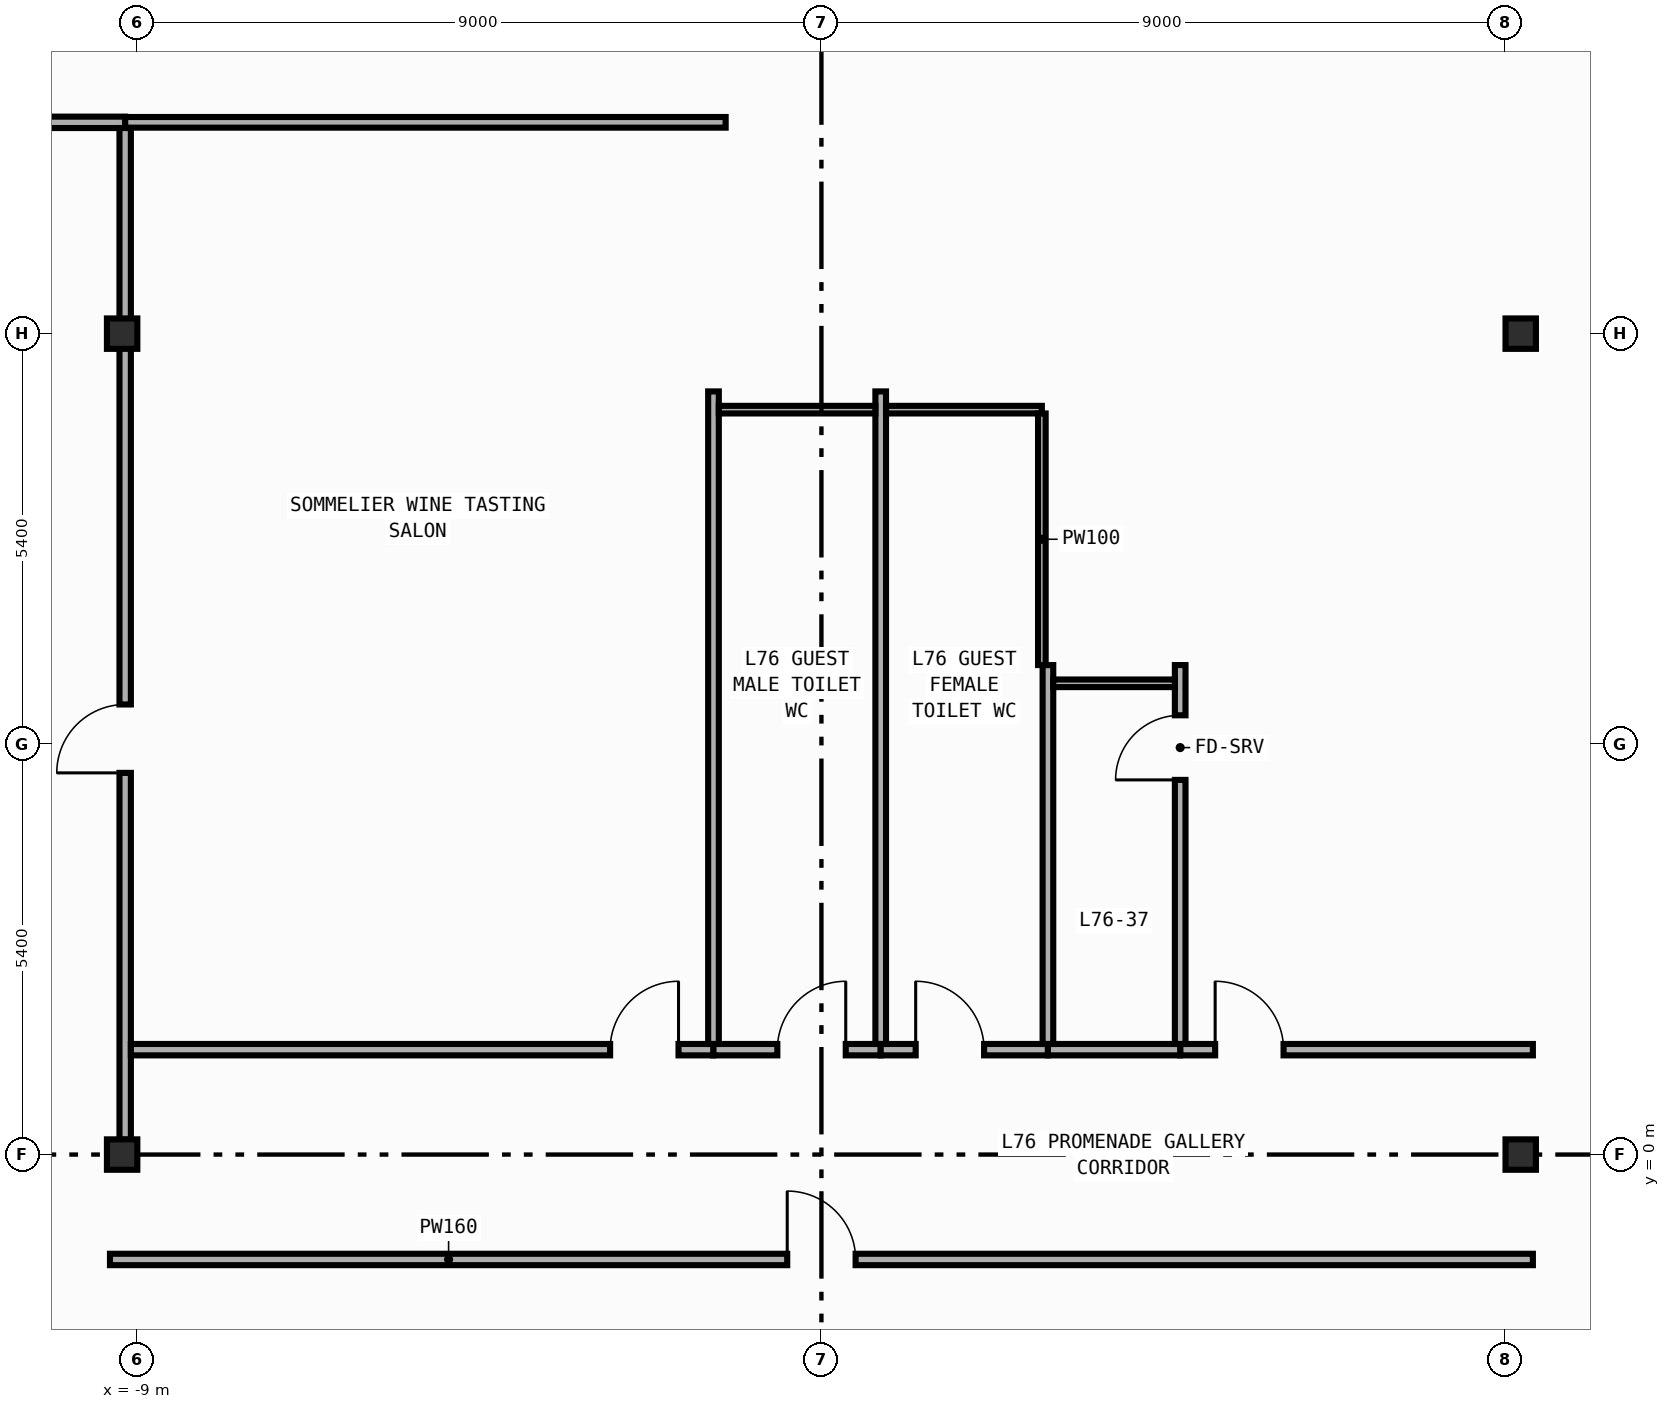
"""IFC4 building model, lengths in metres.
Left out: names, types, materials, properties, quantities, classifications, styles, units other than length and angle.
Written with IfcOpenShell. Run it as: python <this file> out.ifc"""

import sys

from ifc_helpers import new_model, si_unit, direction, frame, frame_2d, origin, origin_2d, place, context, subcontext, project, spatial, rectangle, i_section, extrude, element, fill, save


model = new_model("IFC4")
c1 = context("Model", 3, precision=1e-05, world=origin(), true_north=direction((0.0, 1.0)))
c2 = subcontext(c1, "Body", "Model", "MODEL_VIEW")
j1 = project(units=[si_unit("LENGTHUNIT", "METRE"), si_unit("PLANEANGLEUNIT", "RADIAN")], contexts=[c1])
p1 = place(None, origin())
s1 = spatial("IfcSite", under=j1, at=p1, CompositionType="ELEMENT")
p2 = place(p1, origin())
s2 = spatial("IfcBuilding", under=s1, at=p2, CompositionType="ELEMENT")
p3 = place(p2, frame((0.0, 0.0, 315.6)))
s3 = spatial("IfcBuildingStorey", under=s2, at=p3, CompositionType="ELEMENT", Elevation=315.6)
for number, where, z_axis, x_axis in (
    (1, (-9.2, 0.0, 0.0), (0.0, 0.0, 1.0), (1.0, 0.0, 0.0)),
    (2, (-9.2, 10.8, 0.0), (0.0, 0.0, 1.0), (1.0, 0.0, 0.0)),
    (3, (9.2, 0.0, 0.0), (0.0, 0.0, 1.0), (1.0, 0.0, 0.0)),
    (4, (9.2, 10.8, 0.0), (0.0, 0.0, 1.0), (1.0, 0.0, 0.0)),
):
    element("IfcColumn", number, at=place(p3, frame(where, z_axis=z_axis, x_axis=x_axis)), inside=s3, PredefinedType="COLUMN", context=c2, shape_type="SweptSolid", body=[
        extrude(i_section(OverallWidth=0.4, OverallDepth=0.4, WebThickness=0.013, FlangeThickness=0.021, FilletRadius=0.022, at=origin_2d()), origin(), (0.0, 0.0, 1.0), 4.8),
    ])
p4 = place(p3, frame((-12.0, 13.58, 0.0), z_axis=(0.0, 0.0, 1.0), x_axis=(1.0, 0.0, 0.0)))
e5 = element("IfcWall", 5, at=p4, inside=s3, PredefinedType="PARTITIONING", context=c2, shape_type="SweptSolid", body=[
    extrude(rectangle(XDim=2.84, YDim=0.15, at=frame_2d((1.42, 0.0))), origin(), (0.0, 0.0, 1.0), 4.54),
])
p5 = place(p4, frame((0.46, 0.0, 0.0)))
e6 = element("IfcOpeningElement", 6, at=p5, cuts=e5, PredefinedType="OPENING", context=c2, shape_type="SweptSolid", body=[
    extrude(rectangle(XDim=0.9, YDim=2.15, at=frame_2d((0.45, 1.075))), frame((0.0, 0.085, 0.0), z_axis=(0.0, -1.0, 0.0), x_axis=(1.0, 0.0, 0.0)), (0.0, 0.0, 1.0), 0.17),
])
p6 = place(p3, frame((-9.16, 0.196, 0.0), z_axis=(0.0, 0.0, 1.0), x_axis=(0.0, 1.0, 0.0)))
e7 = element("IfcWall", 7, at=p6, inside=s3, PredefinedType="PARTITIONING", context=c2, shape_type="SweptSolid", body=[
    extrude(rectangle(XDim=13.309, YDim=0.15, at=frame_2d((6.655, 0.0))), origin(), (0.0, 0.0, 1.0), 3.64),
])
p7 = place(p6, frame((4.826, 0.0, 0.0)))
e8 = element("IfcOpeningElement", 8, at=p7, cuts=e7, PredefinedType="OPENING", context=c2, shape_type="SweptSolid", body=[
    extrude(rectangle(XDim=0.9, YDim=2.15, at=frame_2d((0.45, 1.075))), frame((0.0, 0.085, 0.0), z_axis=(0.0, -1.0, 0.0), x_axis=(1.0, 0.0, 0.0)), (0.0, 0.0, 1.0), 0.17),
])
p8 = place(p3, frame((-9.36, -1.38, 0.0), z_axis=(0.0, 0.0, 1.0), x_axis=(1.0, 0.0, 0.0)))
e9 = element("IfcWall", 9, at=p8, inside=s3, PredefinedType="PARTITIONING", context=c2, shape_type="SweptSolid", body=[
    extrude(rectangle(XDim=18.72, YDim=0.15, at=frame_2d((9.36, 0.0))), origin(), (0.0, 0.0, 1.0), 4.54),
])
p9 = place(p8, frame((8.91, 0.0, 0.0)))
e10 = element("IfcOpeningElement", 10, at=p9, cuts=e9, PredefinedType="OPENING", context=c2, shape_type="SweptSolid", body=[
    extrude(rectangle(XDim=0.9, YDim=2.15, at=frame_2d((0.45, 1.075))), frame((0.0, 0.085, 0.0), z_axis=(0.0, -1.0, 0.0), x_axis=(1.0, 0.0, 0.0)), (0.0, 0.0, 1.0), 0.17),
])
p10 = place(p3, frame((-9.085, 1.38, 0.0), z_axis=(0.0, 0.0, 1.0), x_axis=(1.0, 0.0, 0.0)))
e11 = element("IfcWall", 11, at=p10, inside=s3, PredefinedType="PARTITIONING", context=c2, shape_type="SweptSolid", body=[
    extrude(rectangle(XDim=7.665, YDim=0.15, at=frame_2d((3.833, 0.0))), origin(), (0.0, 0.0, 1.0), 4.54),
])
p11 = place(p10, frame((6.305, 0.0, 0.0)))
e12 = element("IfcOpeningElement", 12, at=p11, cuts=e11, PredefinedType="OPENING", context=c2, shape_type="SweptSolid", body=[
    extrude(rectangle(XDim=0.9, YDim=2.15, at=frame_2d((0.45, 1.075))), frame((0.0, 0.085, 0.0), z_axis=(0.0, -1.0, 0.0), x_axis=(1.0, 0.0, 0.0)), (0.0, 0.0, 1.0), 0.17),
])
p12 = place(p3, frame((4.72, 1.38, 0.0), z_axis=(0.0, 0.0, 1.0), x_axis=(1.0, 0.0, 0.0)))
e13 = element("IfcWall", 13, at=p12, inside=s3, PredefinedType="PARTITIONING", context=c2, shape_type="SweptSolid", body=[
    extrude(rectangle(XDim=4.64, YDim=0.15, at=frame_2d((2.32, 0.0))), origin(), (0.0, 0.0, 1.0), 4.54),
])
p13 = place(p12, frame((0.46, 0.0, 0.0)))
e14 = element("IfcOpeningElement", 14, at=p13, cuts=e13, PredefinedType="OPENING", context=c2, shape_type="SweptSolid", body=[
    extrude(rectangle(XDim=0.9, YDim=2.15, at=frame_2d((0.45, 1.075))), frame((0.0, 0.085, 0.0), z_axis=(0.0, -1.0, 0.0), x_axis=(1.0, 0.0, 0.0)), (0.0, 0.0, 1.0), 0.17),
])
p14 = place(p3, frame((-1.42, 1.38, 0.0), z_axis=(0.0, 0.0, 1.0), x_axis=(1.0, 0.0, 0.0)))
e15 = element("IfcWall", 15, at=p14, inside=s3, PredefinedType="PARTITIONING", context=c2, shape_type="SweptSolid", body=[
    extrude(rectangle(XDim=2.2, YDim=0.15, at=frame_2d((1.1, 0.0))), origin(), (0.0, 0.0, 1.0), 4.54),
])
p15 = place(p14, frame((0.84, 0.0, 0.0)))
e16 = element("IfcOpeningElement", 16, at=p15, cuts=e15, PredefinedType="OPENING", context=c2, shape_type="SweptSolid", body=[
    extrude(rectangle(XDim=0.9, YDim=2.15, at=frame_2d((0.45, 1.075))), frame((0.0, 0.085, 0.0), z_axis=(0.0, -1.0, 0.0), x_axis=(1.0, 0.0, 0.0)), (0.0, 0.0, 1.0), 0.17),
])
p16 = place(p3, frame((0.78, 1.38, 0.0), z_axis=(0.0, 0.0, 1.0), x_axis=(1.0, 0.0, 0.0)))
e17 = element("IfcWall", 17, at=p16, inside=s3, PredefinedType="PARTITIONING", context=c2, shape_type="SweptSolid", body=[
    extrude(rectangle(XDim=2.2, YDim=0.15, at=frame_2d((1.1, 0.0))), origin(), (0.0, 0.0, 1.0), 4.54),
])
p17 = place(p16, frame((0.46, 0.0, 0.0)))
e18 = element("IfcOpeningElement", 18, at=p17, cuts=e17, PredefinedType="OPENING", context=c2, shape_type="SweptSolid", body=[
    extrude(rectangle(XDim=0.9, YDim=2.15, at=frame_2d((0.45, 1.075))), frame((0.0, 0.085, 0.0), z_axis=(0.0, -1.0, 0.0), x_axis=(1.0, 0.0, 0.0)), (0.0, 0.0, 1.0), 0.17),
])
p18 = place(p3, frame((2.98, 1.38, 0.0), z_axis=(0.0, 0.0, 1.0), x_axis=(1.0, 0.0, 0.0)))
e19 = element("IfcWall", 19, at=p18, inside=s3, PredefinedType="PARTITIONING", context=c2, shape_type="SweptSolid", body=[
    extrude(rectangle(XDim=1.74, YDim=0.15, at=frame_2d((0.87, 0.0))), origin(), (0.0, 0.0, 1.0), 4.54),
])
p19 = place(p3, frame((-9.16, 13.58, 0.0), z_axis=(0.0, 0.0, 1.0), x_axis=(1.0, 0.0, 0.0)))
e20 = element("IfcWall", 20, at=p19, inside=s3, PredefinedType="PARTITIONING", context=c2, shape_type="SweptSolid", body=[
    extrude(rectangle(XDim=7.9, YDim=0.14, at=frame_2d((3.95, 0.0))), origin(), (0.0, 0.0, 1.0), 4.54),
])
p20 = place(p3, frame((-1.42, 1.455, 0.0), z_axis=(0.0, 0.0, 1.0), x_axis=(0.0, 1.0, 0.0)))
e21 = element("IfcWall", 21, at=p20, inside=s3, PredefinedType="PARTITIONING", context=c2, shape_type="SweptSolid", body=[
    extrude(rectangle(XDim=8.585, YDim=0.14, at=frame_2d((4.292, 0.0))), origin(), (0.0, 0.0, 1.0), 4.54),
])
p21 = place(p3, frame((4.72, 1.455, 0.0), z_axis=(0.0, 0.0, 1.0), x_axis=(0.0, 1.0, 0.0)))
e22 = element("IfcWall", 22, at=p21, inside=s3, PredefinedType="PARTITIONING", context=c2, shape_type="SweptSolid", body=[
    extrude(rectangle(XDim=4.985, YDim=0.14, at=frame_2d((2.492, 0.0))), origin(), (0.0, 0.0, 1.0), 4.19),
])
p22 = place(p21, frame((3.474, 0.0, 0.0)))
e23 = element("IfcOpeningElement", 23, at=p22, cuts=e22, PredefinedType="OPENING", context=c2, shape_type="SweptSolid", body=[
    extrude(rectangle(XDim=0.85, YDim=2.1, at=frame_2d((0.425, 1.05))), frame((0.0, 0.08, 0.0), z_axis=(0.0, -1.0, 0.0), x_axis=(1.0, 0.0, 0.0)), (0.0, 0.0, 1.0), 0.16),
])
p23 = place(p3, frame((0.78, 1.455, 0.0), z_axis=(0.0, 0.0, 1.0), x_axis=(0.0, 1.0, 0.0)))
e24 = element("IfcWall", 24, at=p23, inside=s3, PredefinedType="PARTITIONING", context=c2, shape_type="SweptSolid", body=[
    extrude(rectangle(XDim=8.585, YDim=0.14, at=frame_2d((4.292, 0.0))), origin(), (0.0, 0.0, 1.0), 4.54),
])
p24 = place(p3, frame((2.98, 1.455, 0.0), z_axis=(0.0, 0.0, 1.0), x_axis=(0.0, 1.0, 0.0)))
e25 = element("IfcWall", 25, at=p24, inside=s3, PredefinedType="PARTITIONING", context=c2, shape_type="SweptSolid", body=[
    extrude(rectangle(XDim=4.985, YDim=0.14, at=frame_2d((2.492, 0.0))), origin(), (0.0, 0.0, 1.0), 4.54),
])
p25 = place(p3, frame((-1.35, 9.8, 0.0), z_axis=(0.0, 0.0, 1.0), x_axis=(1.0, 0.0, 0.0)))
e26 = element("IfcWall", 26, at=p25, inside=s3, PredefinedType="PARTITIONING", context=c2, shape_type="SweptSolid", body=[
    extrude(rectangle(XDim=2.06, YDim=0.1, at=frame_2d((1.03, 0.0))), origin(), (0.0, 0.0, 1.0), 4.54),
])
p26 = place(p3, frame((0.85, 9.8, 0.0), z_axis=(0.0, 0.0, 1.0), x_axis=(1.0, 0.0, 0.0)))
e27 = element("IfcWall", 27, at=p26, inside=s3, PredefinedType="PARTITIONING", context=c2, shape_type="SweptSolid", body=[
    extrude(rectangle(XDim=2.05, YDim=0.1, at=frame_2d((1.025, 0.0))), origin(), (0.0, 0.0, 1.0), 4.54),
])
p27 = place(p3, frame((2.9, 9.75, 0.0), z_axis=(0.0, 0.0, 1.0), x_axis=(0.0, -1.0, 0.0)))
e28 = element("IfcWall", 28, at=p27, inside=s3, PredefinedType="PARTITIONING", context=c2, shape_type="SweptSolid", body=[
    extrude(rectangle(XDim=3.31, YDim=0.1, at=frame_2d((1.655, 0.0))), origin(), (0.0, 0.0, 1.0), 4.54),
])
p28 = place(p3, frame((3.05, 6.2, 0.0), z_axis=(0.0, 0.0, 1.0), x_axis=(1.0, 0.0, 0.0)))
e29 = element("IfcWall", 29, at=p28, inside=s3, PredefinedType="PARTITIONING", context=c2, shape_type="SweptSolid", body=[
    extrude(rectangle(XDim=1.6, YDim=0.1, at=frame_2d((0.8, 0.0))), origin(), (0.0, 0.0, 1.0), 4.54),
])
p29 = place(p7, origin())
e30 = element("IfcDoor", 30, at=p29, inside=s3, OperationType="SINGLE_SWING_LEFT", PredefinedType="DOOR", context=c2, shape_type="SweptSolid", body=[
    extrude(rectangle(XDim=0.9, YDim=2.15, at=frame_2d((0.45, 1.075))), frame((0.0, 0.025, 0.0), z_axis=(0.0, -1.0, 0.0), x_axis=(1.0, 0.0, 0.0)), (0.0, 0.0, 1.0), 0.05),
])
fill(e8, e30)
p30 = place(p9, origin())
e31 = element("IfcDoor", 31, at=p30, inside=s3, OperationType="SINGLE_SWING_LEFT", PredefinedType="DOOR", context=c2, shape_type="SweptSolid", body=[
    extrude(rectangle(XDim=0.9, YDim=2.15, at=frame_2d((0.45, 1.075))), frame((0.0, 0.025, 0.0), z_axis=(0.0, -1.0, 0.0), x_axis=(1.0, 0.0, 0.0)), (0.0, 0.0, 1.0), 0.05),
])
fill(e10, e31)
p31 = place(p11, origin())
e32 = element("IfcDoor", 32, at=p31, inside=s3, OperationType="SINGLE_SWING_RIGHT", PredefinedType="DOOR", context=c2, shape_type="SweptSolid", body=[
    extrude(rectangle(XDim=0.9, YDim=2.15, at=frame_2d((0.45, 1.075))), frame((0.0, 0.025, 0.0), z_axis=(0.0, -1.0, 0.0), x_axis=(1.0, 0.0, 0.0)), (0.0, 0.0, 1.0), 0.05),
])
fill(e12, e32)
p32 = place(p13, origin())
e33 = element("IfcDoor", 33, at=p32, inside=s3, OperationType="SINGLE_SWING_LEFT", PredefinedType="DOOR", context=c2, shape_type="SweptSolid", body=[
    extrude(rectangle(XDim=0.9, YDim=2.15, at=frame_2d((0.45, 1.075))), frame((0.0, 0.025, 0.0), z_axis=(0.0, -1.0, 0.0), x_axis=(1.0, 0.0, 0.0)), (0.0, 0.0, 1.0), 0.05),
])
fill(e14, e33)
p33 = place(p15, origin())
e34 = element("IfcDoor", 34, at=p33, inside=s3, OperationType="SINGLE_SWING_RIGHT", PredefinedType="DOOR", context=c2, shape_type="SweptSolid", body=[
    extrude(rectangle(XDim=0.9, YDim=2.15, at=frame_2d((0.45, 1.075))), frame((0.0, 0.025, 0.0), z_axis=(0.0, -1.0, 0.0), x_axis=(1.0, 0.0, 0.0)), (0.0, 0.0, 1.0), 0.05),
])
fill(e16, e34)
p34 = place(p17, origin())
e35 = element("IfcDoor", 35, at=p34, inside=s3, OperationType="SINGLE_SWING_LEFT", PredefinedType="DOOR", context=c2, shape_type="SweptSolid", body=[
    extrude(rectangle(XDim=0.9, YDim=2.15, at=frame_2d((0.45, 1.075))), frame((0.0, 0.025, 0.0), z_axis=(0.0, -1.0, 0.0), x_axis=(1.0, 0.0, 0.0)), (0.0, 0.0, 1.0), 0.05),
])
fill(e18, e35)
p35 = place(p22, origin())
e36 = element("IfcDoor", 36, at=p35, inside=s3, OperationType="SINGLE_SWING_LEFT", PredefinedType="DOOR", context=c2, shape_type="SweptSolid", body=[
    extrude(rectangle(XDim=0.85, YDim=2.1, at=frame_2d((0.425, 1.05))), frame((0.0, 0.025, 0.0), z_axis=(0.0, -1.0, 0.0), x_axis=(1.0, 0.0, 0.0)), (0.0, 0.0, 1.0), 0.05),
])
fill(e23, e36)
save(model, sys.argv[1])
